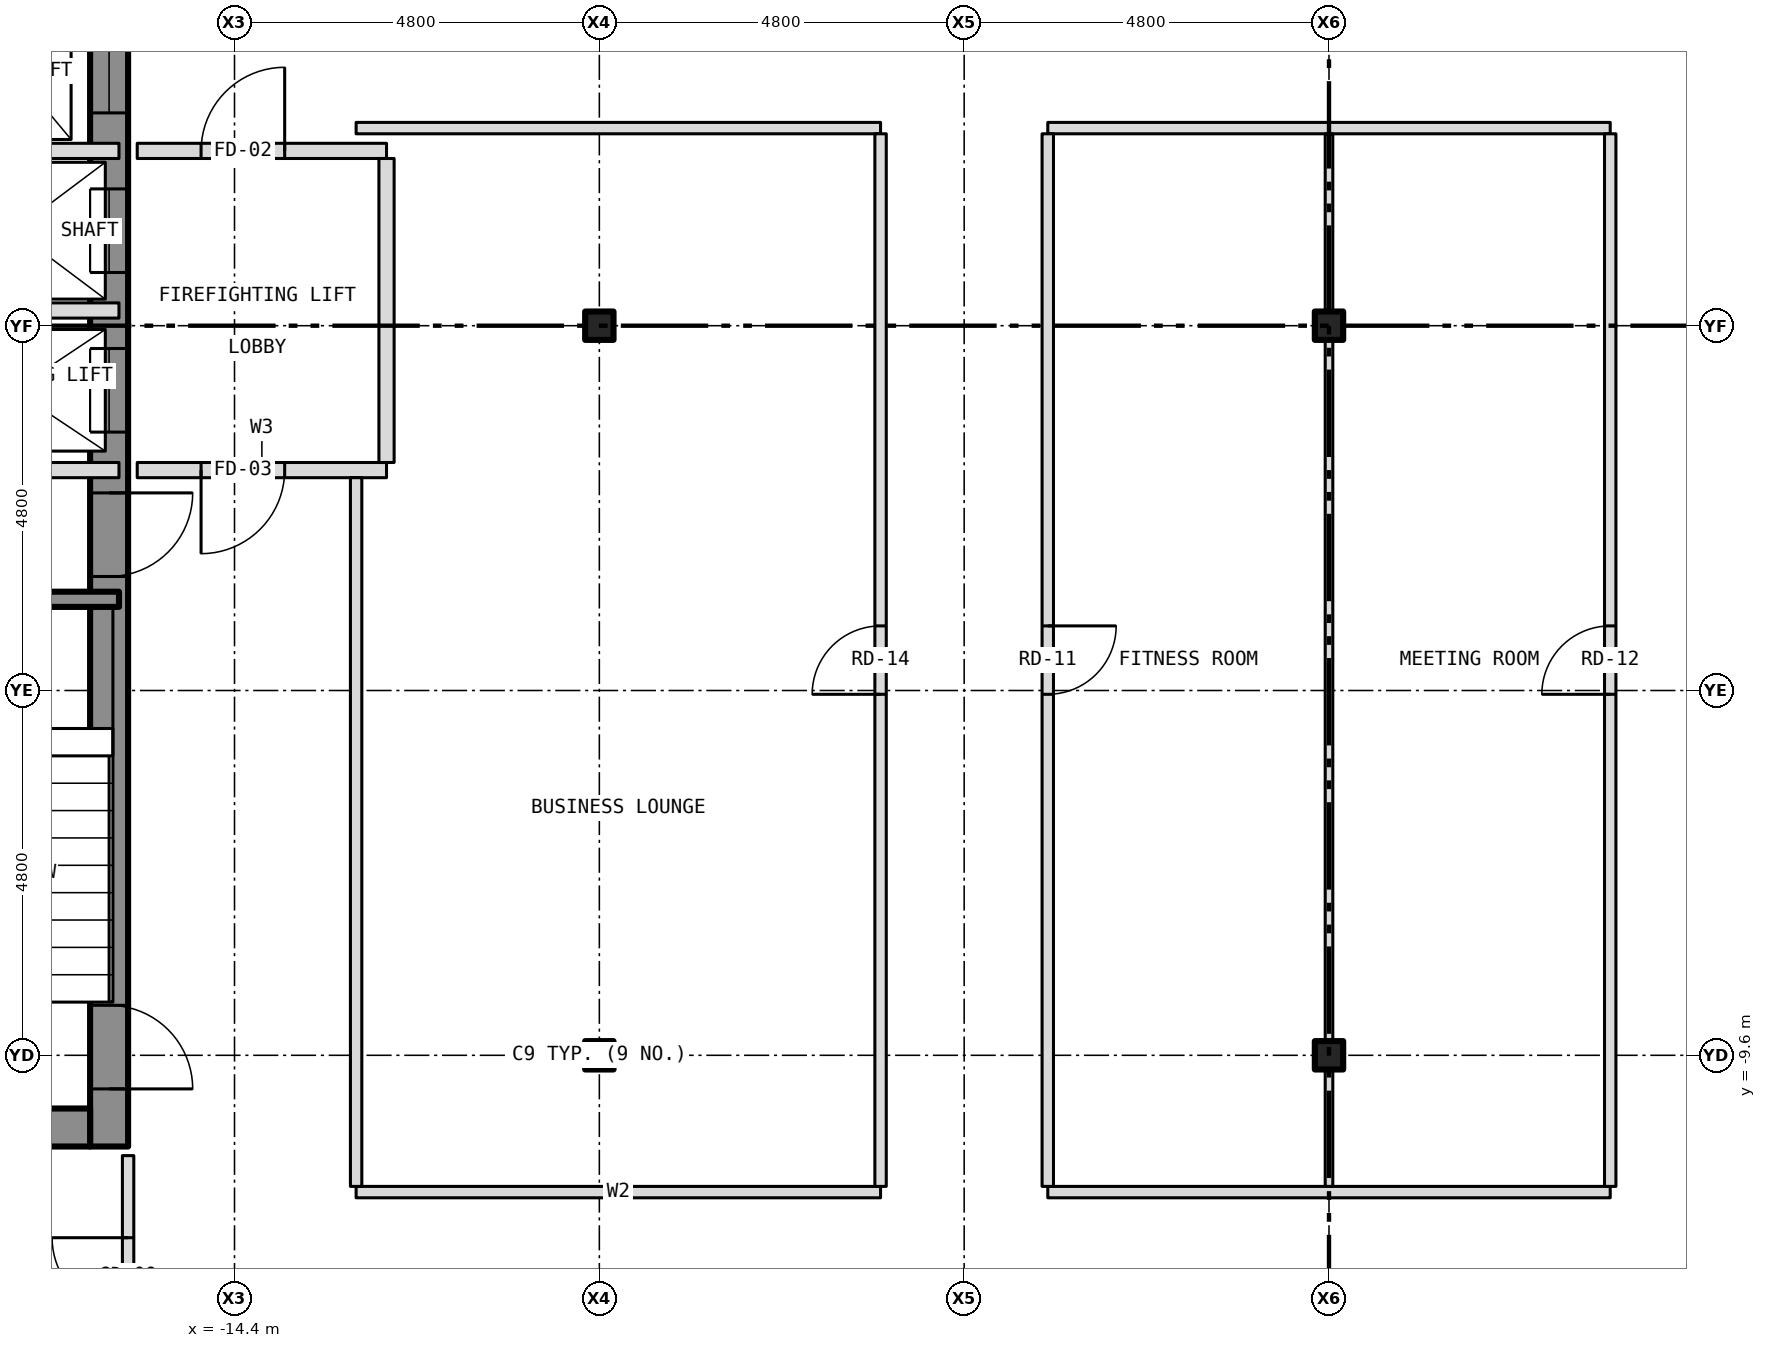
"""IFC4 building model, lengths in metres.
Left out: names, types, materials, properties, quantities, classifications, styles, units other than length and angle.
Written with IfcOpenShell. Run it as: python <this file> out.ifc"""

import sys

from ifc_helpers import new_model, si_unit, direction, frame, frame_2d, origin, origin_2d, place, context, subcontext, project, spatial, rectangle, i_section, extrude, element, fill, save


model = new_model("IFC4")
c1 = context("Model", 3, precision=1e-05, world=origin(), true_north=direction((0.0, 1.0)))
c2 = subcontext(c1, "Body", "Model", "MODEL_VIEW")
j1 = project(units=[si_unit("LENGTHUNIT", "METRE"), si_unit("PLANEANGLEUNIT", "RADIAN")], contexts=[c1])
p1 = place(None, origin())
s1 = spatial("IfcSite", under=j1, at=p1, CompositionType="ELEMENT")
p2 = place(p1, origin())
s2 = spatial("IfcBuilding", under=s1, at=p2, CompositionType="ELEMENT")
p3 = place(p2, frame((0.0, 0.0, 151.5)))
s3 = spatial("IfcBuildingStorey", under=s2, at=p3, CompositionType="ELEMENT", Elevation=151.5)
for number, where, z_axis, x_axis in (
    (1, (-9.6, -9.6, -0.15), (0.0, 0.0, 1.0), (1.0, 0.0, 0.0)),
    (2, (-9.6, 0.0, -0.15), (0.0, 0.0, 1.0), (1.0, 0.0, 0.0)),
    (3, (0.0, -9.6, -0.15), (0.0, 0.0, 1.0), (1.0, 0.0, 0.0)),
    (4, (0.0, 0.0, -0.15), (0.0, 0.0, 1.0), (1.0, 0.0, 0.0)),
):
    element("IfcColumn", number, at=place(p3, frame(where, z_axis=z_axis, x_axis=x_axis)), inside=s3, PredefinedType="COLUMN", context=c2, shape_type="SweptSolid", body=[
        extrude(i_section(OverallWidth=0.373, OverallDepth=0.373, WebThickness=0.016, FlangeThickness=0.026, at=origin_2d()), origin(), (0.0, 0.0, 1.0), 3.5),
    ])
p4 = place(p3, frame((-16.05, -10.8, 0.0), z_axis=(0.0, 0.0, 1.0), x_axis=(0.0, 1.0, 0.0)))
e5 = element("IfcWall", 5, at=p4, inside=s3, PredefinedType="SHEAR", context=c2, shape_type="SweptSolid", body=[
    extrude(rectangle(XDim=21.6, YDim=0.5, at=frame_2d((10.8, 0.0))), origin(), (0.0, 0.0, 1.0), 3.25),
])
p5 = place(p4, frame((9.4, 0.0, 0.0)))
e6 = element("IfcOpeningElement", 6, at=p5, cuts=e5, PredefinedType="OPENING", context=c2, shape_type="SweptSolid", body=[
    extrude(rectangle(XDim=1.1, YDim=2.1, at=frame_2d((0.55, 1.05))), frame((0.0, 0.262, 0.0), z_axis=(0.0, -1.0, 0.0), x_axis=(1.0, 0.0, 0.0)), (0.0, 0.0, 1.0), 0.524),
])
p6 = place(p4, frame((11.5, 0.0, 0.0)))
e7 = element("IfcOpeningElement", 7, at=p6, cuts=e5, PredefinedType="OPENING", context=c2, shape_type="SweptSolid", body=[
    extrude(rectangle(XDim=1.1, YDim=2.1, at=frame_2d((0.55, 1.05))), frame((0.0, 0.262, 0.0), z_axis=(0.0, -1.0, 0.0), x_axis=(1.0, 0.0, 0.0)), (0.0, 0.0, 1.0), 0.524),
])
p7 = place(p4, frame((13.6, 0.0, 0.0)))
e8 = element("IfcOpeningElement", 8, at=p7, cuts=e5, PredefinedType="OPENING", context=c2, shape_type="SweptSolid", body=[
    extrude(rectangle(XDim=1.1, YDim=2.1, at=frame_2d((0.55, 1.05))), frame((0.0, 0.262, 0.0), z_axis=(0.0, -1.0, 0.0), x_axis=(1.0, 0.0, 0.0)), (0.0, 0.0, 1.0), 0.524),
])
p8 = place(p4, frame((15.7, 0.0, 0.0)))
e9 = element("IfcOpeningElement", 9, at=p8, cuts=e5, PredefinedType="OPENING", context=c2, shape_type="SweptSolid", body=[
    extrude(rectangle(XDim=1.1, YDim=2.1, at=frame_2d((0.55, 1.05))), frame((0.0, 0.262, 0.0), z_axis=(0.0, -1.0, 0.0), x_axis=(1.0, 0.0, 0.0)), (0.0, 0.0, 1.0), 0.524),
])
p9 = place(p4, frame((17.8, 0.0, 0.0)))
e10 = element("IfcOpeningElement", 10, at=p9, cuts=e5, PredefinedType="OPENING", context=c2, shape_type="SweptSolid", body=[
    extrude(rectangle(XDim=1.1, YDim=2.1, at=frame_2d((0.55, 1.05))), frame((0.0, 0.262, 0.0), z_axis=(0.0, -1.0, 0.0), x_axis=(1.0, 0.0, 0.0)), (0.0, 0.0, 1.0), 0.524),
])
p10 = place(p4, frame((0.758, 0.0, 0.0)))
e11 = element("IfcOpeningElement", 11, at=p10, cuts=e5, PredefinedType="OPENING", context=c2, shape_type="SweptSolid", body=[
    extrude(rectangle(XDim=1.1, YDim=2.1, at=frame_2d((0.55, 1.05))), frame((0.0, 0.262, 0.0), z_axis=(0.0, -1.0, 0.0), x_axis=(1.0, 0.0, 0.0)), (0.0, 0.0, 1.0), 0.524),
])
p11 = place(p4, frame((7.5, 0.0, 0.0)))
e12 = element("IfcOpeningElement", 12, at=p11, cuts=e5, PredefinedType="OPENING", context=c2, shape_type="SweptSolid", body=[
    extrude(rectangle(XDim=1.1, YDim=2.1, at=frame_2d((0.55, 1.05))), frame((0.0, 0.262, 0.0), z_axis=(0.0, -1.0, 0.0), x_axis=(1.0, 0.0, 0.0)), (0.0, 0.0, 1.0), 0.524),
])
p12 = place(p4, frame((20.0, 0.0, 0.0)))
e13 = element("IfcOpeningElement", 13, at=p12, cuts=e5, PredefinedType="OPENING", context=c2, shape_type="SweptSolid", body=[
    extrude(rectangle(XDim=0.9, YDim=2.1, at=frame_2d((0.45, 1.05))), frame((0.0, 0.262, 0.0), z_axis=(0.0, -1.0, 0.0), x_axis=(1.0, 0.0, 0.0)), (0.0, 0.0, 1.0), 0.524),
])
p13 = place(p3, frame((-21.1, -10.55, 0.0), z_axis=(0.0, 0.0, 1.0), x_axis=(1.0, 0.0, 0.0)))
e14 = element("IfcWall", 14, at=p13, inside=s3, PredefinedType="SHEAR", context=c2, shape_type="SweptSolid", body=[
    extrude(rectangle(XDim=4.8, YDim=0.5, at=frame_2d((2.4, 0.0))), origin(), (0.0, 0.0, 1.0), 3.25),
])
p14 = place(p3, frame((-12.8, -11.4, 0.0), z_axis=(0.0, 0.0, 1.0), x_axis=(1.0, 0.0, 0.0)))
e15 = element("IfcWall", 15, at=p14, inside=s3, PredefinedType="PARTITIONING", context=c2, shape_type="SweptSolid", body=[
    extrude(rectangle(XDim=6.9, YDim=0.15, at=frame_2d((3.45, 0.0))), origin(), (0.0, 0.0, 1.0), 3.35),
])
p15 = place(p3, frame((-3.7, -11.4, 0.0), z_axis=(0.0, 0.0, 1.0), x_axis=(1.0, 0.0, 0.0)))
e16 = element("IfcWall", 16, at=p15, inside=s3, PredefinedType="PARTITIONING", context=c2, shape_type="SweptSolid", body=[
    extrude(rectangle(XDim=7.4, YDim=0.15, at=frame_2d((3.7, 0.0))), origin(), (0.0, 0.0, 1.0), 3.35),
])
p16 = place(p3, frame((-20.0, -3.6, 0.0), z_axis=(0.0, 0.0, 1.0), x_axis=(1.0, 0.0, 0.0)))
e17 = element("IfcWall", 17, at=p16, inside=s3, PredefinedType="SHEAR", context=c2, shape_type="SweptSolid", body=[
    extrude(rectangle(XDim=4.08, YDim=0.2, at=frame_2d((2.04, 0.0))), origin(), (0.0, 0.0, 1.0), 3.25),
])
p17 = place(p3, frame((-21.48, -1.9, 0.0), z_axis=(0.0, 0.0, 1.0), x_axis=(1.0, 0.0, 0.0)))
e18 = element("IfcWall", 18, at=p17, inside=s3, PredefinedType="PARTITIONING", context=c2, shape_type="SweptSolid", body=[
    extrude(rectangle(XDim=5.56, YDim=0.2, at=frame_2d((2.78, 0.0))), origin(), (0.0, 0.0, 1.0), 3.25),
])
p18 = place(p17, frame((0.83, 0.0, 0.0)))
e19 = element("IfcOpeningElement", 19, at=p18, cuts=e18, PredefinedType="OPENING", context=c2, shape_type="SweptSolid", body=[
    extrude(rectangle(XDim=0.9, YDim=2.1, at=frame_2d((0.45, 1.05))), frame((0.0, 0.112, 0.0), z_axis=(0.0, -1.0, 0.0), x_axis=(1.0, 0.0, 0.0)), (0.0, 0.0, 1.0), 0.224),
])
p19 = place(p3, frame((-15.68, -1.9, 0.0), z_axis=(0.0, 0.0, 1.0), x_axis=(1.0, 0.0, 0.0)))
e20 = element("IfcWall", 20, at=p19, inside=s3, PredefinedType="PARTITIONING", context=c2, shape_type="SweptSolid", body=[
    extrude(rectangle(XDim=3.28, YDim=0.2, at=frame_2d((1.64, 0.0))), origin(), (0.0, 0.0, 1.0), 3.35),
])
p20 = place(p19, frame((0.84, 0.0, 0.0)))
e21 = element("IfcOpeningElement", 21, at=p20, cuts=e20, PredefinedType="OPENING", context=c2, shape_type="SweptSolid", body=[
    extrude(rectangle(XDim=1.1, YDim=2.1, at=frame_2d((0.55, 1.05))), frame((0.0, 0.112, 0.0), z_axis=(0.0, -1.0, 0.0), x_axis=(1.0, 0.0, 0.0)), (0.0, 0.0, 1.0), 0.224),
])
for number, where, z_axis, x_axis in (
    (22, (-18.8, 0.2, 0.0), (0.0, 0.0, 1.0), (1.0, 0.0, 0.0)),
    (23, (-18.8, 2.3, 0.0), (0.0, 0.0, 1.0), (1.0, 0.0, 0.0)),
):
    element("IfcWall", number, at=place(p3, frame(where, z_axis=z_axis, x_axis=x_axis)), inside=s3, PredefinedType="PARTITIONING", context=c2, shape_type="SweptSolid", body=[
        extrude(rectangle(XDim=2.88, YDim=0.2, at=frame_2d((1.44, 0.0))), origin(), (0.0, 0.0, 1.0), 3.25),
    ])
p21 = place(p3, frame((-15.68, 2.3, 0.0), z_axis=(0.0, 0.0, 1.0), x_axis=(1.0, 0.0, 0.0)))
e24 = element("IfcWall", 24, at=p21, inside=s3, PredefinedType="PARTITIONING", context=c2, shape_type="SweptSolid", body=[
    extrude(rectangle(XDim=3.28, YDim=0.2, at=frame_2d((1.64, 0.0))), origin(), (0.0, 0.0, 1.0), 3.35),
])
p22 = place(p21, frame((0.84, 0.0, 0.0)))
e25 = element("IfcOpeningElement", 25, at=p22, cuts=e24, PredefinedType="OPENING", context=c2, shape_type="SweptSolid", body=[
    extrude(rectangle(XDim=1.1, YDim=2.1, at=frame_2d((0.55, 1.05))), frame((0.0, 0.112, 0.0), z_axis=(0.0, -1.0, 0.0), x_axis=(1.0, 0.0, 0.0)), (0.0, 0.0, 1.0), 0.224),
])
p23 = place(p3, frame((-12.8, 2.6, 0.0), z_axis=(0.0, 0.0, 1.0), x_axis=(1.0, 0.0, 0.0)))
e26 = element("IfcWall", 26, at=p23, inside=s3, PredefinedType="PARTITIONING", context=c2, shape_type="SweptSolid", body=[
    extrude(rectangle(XDim=6.9, YDim=0.15, at=frame_2d((3.45, 0.0))), origin(), (0.0, 0.0, 1.0), 3.35),
])
p24 = place(p3, frame((-3.7, 2.6, 0.0), z_axis=(0.0, 0.0, 1.0), x_axis=(1.0, 0.0, 0.0)))
e27 = element("IfcWall", 27, at=p24, inside=s3, PredefinedType="PARTITIONING", context=c2, shape_type="SweptSolid", body=[
    extrude(rectangle(XDim=7.4, YDim=0.15, at=frame_2d((3.7, 0.0))), origin(), (0.0, 0.0, 1.0), 3.35),
])
p25 = place(p3, frame((-15.8, -13.525, 0.0), z_axis=(0.0, 0.0, 1.0), x_axis=(0.0, 1.0, 0.0)))
e28 = element("IfcWall", 28, at=p25, inside=s3, PredefinedType="PARTITIONING", context=c2, shape_type="SweptSolid", body=[
    extrude(rectangle(XDim=2.605, YDim=0.15, at=frame_2d((1.302, 0.0))), origin(), (0.0, 0.0, 1.0), 3.35),
])
p26 = place(p25, frame((0.525, 0.0, 0.0)))
e29 = element("IfcOpeningElement", 29, at=p26, cuts=e28, PredefinedType="OPENING", context=c2, shape_type="SweptSolid", body=[
    extrude(rectangle(XDim=1.0, YDim=2.1, at=frame_2d((0.5, 1.05))), frame((0.0, 0.087, 0.0), z_axis=(0.0, -1.0, 0.0), x_axis=(1.0, 0.0, 0.0)), (0.0, 0.0, 1.0), 0.174),
])
p27 = place(p3, frame((-12.8, -11.325, 0.0), z_axis=(0.0, 0.0, 1.0), x_axis=(0.0, 1.0, 0.0)))
e30 = element("IfcWall", 30, at=p27, inside=s3, PredefinedType="PARTITIONING", context=c2, shape_type="SweptSolid", body=[
    extrude(rectangle(XDim=9.325, YDim=0.15, at=frame_2d((4.663, 0.0))), origin(), (0.0, 0.0, 1.0), 3.35),
])
p28 = place(p3, frame((-12.4, -1.8, 0.0), z_axis=(0.0, 0.0, 1.0), x_axis=(0.0, 1.0, 0.0)))
e31 = element("IfcWall", 31, at=p28, inside=s3, PredefinedType="PARTITIONING", context=c2, shape_type="SweptSolid", body=[
    extrude(rectangle(XDim=4.0, YDim=0.2, at=frame_2d((2.0, 0.0))), origin(), (0.0, 0.0, 1.0), 3.35),
])
p29 = place(p3, frame((-5.9, -11.325, 0.0), z_axis=(0.0, 0.0, 1.0), x_axis=(0.0, 1.0, 0.0)))
e32 = element("IfcWall", 32, at=p29, inside=s3, PredefinedType="PARTITIONING", context=c2, shape_type="SweptSolid", body=[
    extrude(rectangle(XDim=13.85, YDim=0.15, at=frame_2d((6.925, 0.0))), origin(), (0.0, 0.0, 1.0), 3.35),
])
p30 = place(p29, frame((6.475, 0.0, 0.0)))
e33 = element("IfcOpeningElement", 33, at=p30, cuts=e32, PredefinedType="OPENING", context=c2, shape_type="SweptSolid", body=[
    extrude(rectangle(XDim=0.9, YDim=2.1, at=frame_2d((0.45, 1.05))), frame((0.0, 0.087, 0.0), z_axis=(0.0, -1.0, 0.0), x_axis=(1.0, 0.0, 0.0)), (0.0, 0.0, 1.0), 0.174),
])
p31 = place(p3, frame((-3.7, -11.325, 0.0), z_axis=(0.0, 0.0, 1.0), x_axis=(0.0, 1.0, 0.0)))
e34 = element("IfcWall", 34, at=p31, inside=s3, PredefinedType="PARTITIONING", context=c2, shape_type="SweptSolid", body=[
    extrude(rectangle(XDim=13.85, YDim=0.15, at=frame_2d((6.925, 0.0))), origin(), (0.0, 0.0, 1.0), 3.35),
])
p32 = place(p31, frame((6.475, 0.0, 0.0)))
e35 = element("IfcOpeningElement", 35, at=p32, cuts=e34, PredefinedType="OPENING", context=c2, shape_type="SweptSolid", body=[
    extrude(rectangle(XDim=0.9, YDim=2.1, at=frame_2d((0.45, 1.05))), frame((0.0, 0.087, 0.0), z_axis=(0.0, -1.0, 0.0), x_axis=(1.0, 0.0, 0.0)), (0.0, 0.0, 1.0), 0.174),
])
p33 = place(p3, frame((0.0, -11.325, 0.0), z_axis=(0.0, 0.0, 1.0), x_axis=(0.0, 1.0, 0.0)))
e36 = element("IfcWall", 36, at=p33, inside=s3, PredefinedType="PARTITIONING", context=c2, shape_type="SweptSolid", body=[
    extrude(rectangle(XDim=1.538, YDim=0.1, at=frame_2d((0.769, 0.0))), origin(), (0.0, 0.0, 1.0), 2.728),
])
p34 = place(p3, frame((0.0, -9.787, 0.0), z_axis=(0.0, 0.0, 1.0), x_axis=(0.0, 1.0, 0.0)))
e37 = element("IfcWall", 37, at=p34, inside=s3, PredefinedType="PARTITIONING", context=c2, shape_type="SweptSolid", body=[
    extrude(rectangle(XDim=0.374, YDim=0.1, at=frame_2d((0.187, 0.0))), origin(), (0.0, 0.0, 1.0), 3.35),
])
p35 = place(p3, frame((0.0, -9.413, 0.0), z_axis=(0.0, 0.0, 1.0), x_axis=(0.0, 1.0, 0.0)))
e38 = element("IfcWall", 38, at=p35, inside=s3, PredefinedType="PARTITIONING", context=c2, shape_type="SweptSolid", body=[
    extrude(rectangle(XDim=9.226, YDim=0.1, at=frame_2d((4.613, 0.0))), origin(), (0.0, 0.0, 1.0), 2.728),
])
p36 = place(p3, frame((0.0, -0.187, 0.0), z_axis=(0.0, 0.0, 1.0), x_axis=(0.0, 1.0, 0.0)))
e39 = element("IfcWall", 39, at=p36, inside=s3, PredefinedType="PARTITIONING", context=c2, shape_type="SweptSolid", body=[
    extrude(rectangle(XDim=0.374, YDim=0.1, at=frame_2d((0.187, 0.0))), origin(), (0.0, 0.0, 1.0), 3.35),
])
p37 = place(p3, frame((0.0, 0.187, 0.0), z_axis=(0.0, 0.0, 1.0), x_axis=(0.0, 1.0, 0.0)))
e40 = element("IfcWall", 40, at=p37, inside=s3, PredefinedType="PARTITIONING", context=c2, shape_type="SweptSolid", body=[
    extrude(rectangle(XDim=2.338, YDim=0.1, at=frame_2d((1.169, 0.0))), origin(), (0.0, 0.0, 1.0), 2.728),
])
p38 = place(p3, frame((3.7, -11.325, 0.0), z_axis=(0.0, 0.0, 1.0), x_axis=(0.0, 1.0, 0.0)))
e41 = element("IfcWall", 41, at=p38, inside=s3, PredefinedType="PARTITIONING", context=c2, shape_type="SweptSolid", body=[
    extrude(rectangle(XDim=13.85, YDim=0.15, at=frame_2d((6.925, 0.0))), origin(), (0.0, 0.0, 1.0), 3.35),
])
p39 = place(p38, frame((6.475, 0.0, 0.0)))
e42 = element("IfcOpeningElement", 42, at=p39, cuts=e41, PredefinedType="OPENING", context=c2, shape_type="SweptSolid", body=[
    extrude(rectangle(XDim=0.9, YDim=2.1, at=frame_2d((0.45, 1.05))), frame((0.0, 0.087, 0.0), z_axis=(0.0, -1.0, 0.0), x_axis=(1.0, 0.0, 0.0)), (0.0, 0.0, 1.0), 0.174),
])
p40 = place(p5, origin())
e43 = element("IfcDoor", 43, at=p40, inside=s3, OperationType="SLIDING_TO_LEFT", PredefinedType="DOOR", context=c2, shape_type="SweptSolid", body=[
    extrude(rectangle(XDim=1.1, YDim=2.1, at=frame_2d((0.55, 1.05))), frame((0.0, 0.025, 0.0), z_axis=(0.0, -1.0, 0.0), x_axis=(1.0, 0.0, 0.0)), (0.0, 0.0, 1.0), 0.05),
])
fill(e6, e43)
p41 = place(p6, origin())
e44 = element("IfcDoor", 44, at=p41, inside=s3, OperationType="SLIDING_TO_LEFT", PredefinedType="DOOR", context=c2, shape_type="SweptSolid", body=[
    extrude(rectangle(XDim=1.1, YDim=2.1, at=frame_2d((0.55, 1.05))), frame((0.0, 0.025, 0.0), z_axis=(0.0, -1.0, 0.0), x_axis=(1.0, 0.0, 0.0)), (0.0, 0.0, 1.0), 0.05),
])
fill(e7, e44)
p42 = place(p7, origin())
e45 = element("IfcDoor", 45, at=p42, inside=s3, OperationType="SLIDING_TO_LEFT", PredefinedType="DOOR", context=c2, shape_type="SweptSolid", body=[
    extrude(rectangle(XDim=1.1, YDim=2.1, at=frame_2d((0.55, 1.05))), frame((0.0, 0.025, 0.0), z_axis=(0.0, -1.0, 0.0), x_axis=(1.0, 0.0, 0.0)), (0.0, 0.0, 1.0), 0.05),
])
fill(e8, e45)
p43 = place(p10, origin())
e46 = element("IfcDoor", 46, at=p43, inside=s3, OperationType="SINGLE_SWING_LEFT", PredefinedType="DOOR", context=c2, shape_type="SweptSolid", body=[
    extrude(rectangle(XDim=1.1, YDim=2.1, at=frame_2d((0.55, 1.05))), frame((0.0, 0.025, 0.0), z_axis=(0.0, -1.0, 0.0), x_axis=(1.0, 0.0, 0.0)), (0.0, 0.0, 1.0), 0.05),
])
fill(e11, e46)
p44 = place(p11, origin())
e47 = element("IfcDoor", 47, at=p44, inside=s3, OperationType="SINGLE_SWING_RIGHT", PredefinedType="DOOR", context=c2, shape_type="SweptSolid", body=[
    extrude(rectangle(XDim=1.1, YDim=2.1, at=frame_2d((0.55, 1.05))), frame((0.0, 0.025, 0.0), z_axis=(0.0, -1.0, 0.0), x_axis=(1.0, 0.0, 0.0)), (0.0, 0.0, 1.0), 0.05),
])
fill(e12, e47)
p45 = place(p22, origin())
e48 = element("IfcDoor", 48, at=p45, inside=s3, OperationType="SINGLE_SWING_RIGHT", PredefinedType="DOOR", context=c2, shape_type="SweptSolid", body=[
    extrude(rectangle(XDim=1.1, YDim=2.1, at=frame_2d((0.55, 1.05))), frame((0.0, 0.025, 0.0), z_axis=(0.0, -1.0, 0.0), x_axis=(1.0, 0.0, 0.0)), (0.0, 0.0, 1.0), 0.05),
])
fill(e25, e48)
p46 = place(p20, origin())
e49 = element("IfcDoor", 49, at=p46, inside=s3, OperationType="SINGLE_SWING_LEFT", PredefinedType="DOOR", context=c2, shape_type="SweptSolid", body=[
    extrude(rectangle(XDim=1.1, YDim=2.1, at=frame_2d((0.55, 1.05))), frame((0.0, 0.025, 0.0), z_axis=(0.0, -1.0, 0.0), x_axis=(1.0, 0.0, 0.0)), (0.0, 0.0, 1.0), 0.05),
])
fill(e21, e49)
p47 = place(p26, origin())
e50 = element("IfcDoor", 50, at=p47, inside=s3, OperationType="SINGLE_SWING_RIGHT", PredefinedType="DOOR", context=c2, shape_type="SweptSolid", body=[
    extrude(rectangle(XDim=1.0, YDim=2.1, at=frame_2d((0.5, 1.05))), frame((0.0, 0.025, 0.0), z_axis=(0.0, -1.0, 0.0), x_axis=(1.0, 0.0, 0.0)), (0.0, 0.0, 1.0), 0.05),
])
fill(e29, e50)
p48 = place(p32, origin())
e51 = element("IfcDoor", 51, at=p48, inside=s3, OperationType="SINGLE_SWING_RIGHT", PredefinedType="DOOR", context=c2, shape_type="SweptSolid", body=[
    extrude(rectangle(XDim=0.9, YDim=2.1, at=frame_2d((0.45, 1.05))), frame((0.0, 0.025, 0.0), z_axis=(0.0, -1.0, 0.0), x_axis=(1.0, 0.0, 0.0)), (0.0, 0.0, 1.0), 0.05),
])
fill(e35, e51)
p49 = place(p39, origin())
e52 = element("IfcDoor", 52, at=p49, inside=s3, OperationType="SINGLE_SWING_LEFT", PredefinedType="DOOR", context=c2, shape_type="SweptSolid", body=[
    extrude(rectangle(XDim=0.9, YDim=2.1, at=frame_2d((0.45, 1.05))), frame((0.0, 0.025, 0.0), z_axis=(0.0, -1.0, 0.0), x_axis=(1.0, 0.0, 0.0)), (0.0, 0.0, 1.0), 0.05),
])
fill(e42, e52)
p50 = place(p30, origin())
e53 = element("IfcDoor", 53, at=p50, inside=s3, OperationType="SINGLE_SWING_LEFT", PredefinedType="DOOR", context=c2, shape_type="SweptSolid", body=[
    extrude(rectangle(XDim=0.9, YDim=2.1, at=frame_2d((0.45, 1.05))), frame((0.0, 0.025, 0.0), z_axis=(0.0, -1.0, 0.0), x_axis=(1.0, 0.0, 0.0)), (0.0, 0.0, 1.0), 0.05),
])
fill(e33, e53)
save(model, sys.argv[1])
